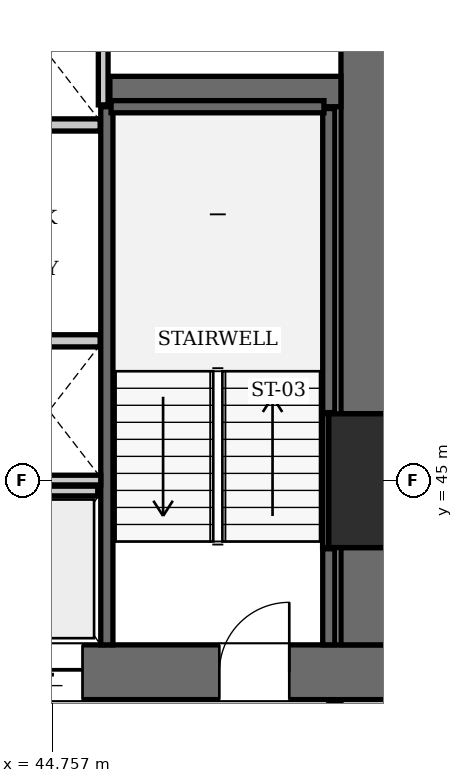
"""IFC4 building model, lengths in metres.
Left out: names, types, materials, properties, quantities, classifications, styles, units other than length and angle.
Written with IfcOpenShell. Run it as: python <this file> out.ifc"""

import sys

from ifc_helpers import new_model, si_unit, direction, frame, frame_2d, origin, origin_2d, place, context, subcontext, project, spatial, rectangle, extrude, element, fill, save


model = new_model("IFC4")
c1 = context("Model", 3, precision=1e-05, world=origin(), true_north=direction((0.0, 1.0)))
c2 = subcontext(c1, "Body", "Model", "MODEL_VIEW")
j1 = project(units=[si_unit("LENGTHUNIT", "METRE"), si_unit("PLANEANGLEUNIT", "RADIAN")], contexts=[c1])
p1 = place(None, origin())
s1 = spatial("IfcSite", under=j1, at=p1, CompositionType="ELEMENT")
p2 = place(p1, origin())
s2 = spatial("IfcBuilding", under=s1, at=p2, CompositionType="ELEMENT")
p3 = place(p2, frame((0.0, 0.0, 34.65)))
s3 = spatial("IfcBuildingStorey", under=s2, at=p3, CompositionType="ELEMENT", Elevation=34.65)
p4 = place(p3, frame((50.4, 45.0, 0.0), z_axis=(0.0, 0.0, 1.0), x_axis=(1.0, 0.0, 0.0)))
e1 = element("IfcColumn", 1, at=p4, inside=s3, PredefinedType="COLUMN", context=c2, shape_type="SweptSolid", body=[
    extrude(rectangle(XDim=2.2, YDim=2.2, at=origin_2d()), origin(), (0.0, 0.0, 1.0), 3.85),
])
p5 = place(p3, frame((43.6, 41.85, 0.0), z_axis=(0.0, 0.0, 1.0), x_axis=(1.0, 0.0, 0.0)))
e2 = element("IfcWall", 2, at=p5, inside=s3, PredefinedType="SHEAR", context=c2, shape_type="SweptSolid", body=[
    extrude(rectangle(XDim=6.8, YDim=0.9, at=frame_2d((3.4, 0.0))), origin(), (0.0, 0.0, 1.0), 3.85),
])
p6 = place(p5, frame((3.9, 0.0, 0.0)))
e3 = element("IfcOpeningElement", 3, at=p6, cuts=e2, PredefinedType="OPENING", context=c2, shape_type="SweptSolid", body=[
    extrude(rectangle(XDim=1.15, YDim=2.15, at=frame_2d((0.575, 1.075))), frame((0.0, 0.46, 0.0), z_axis=(0.0, -1.0, 0.0), x_axis=(1.0, 0.0, 0.0)), (0.0, 0.0, 1.0), 0.92),
])
p7 = place(p5, frame((0.55, 0.0, 0.0)))
e4 = element("IfcOpeningElement", 4, at=p7, cuts=e2, PredefinedType="OPENING", context=c2, shape_type="SweptSolid", body=[
    extrude(rectangle(XDim=1.1, YDim=2.2, at=frame_2d((0.55, 1.1))), frame((0.0, 0.46, 0.0), z_axis=(0.0, -1.0, 0.0), x_axis=(1.0, 0.0, 0.0)), (0.0, 0.0, 1.0), 0.92),
])
p8 = place(p3, frame((49.95, 42.3, 0.0), z_axis=(0.0, 0.0, 1.0), x_axis=(0.0, 1.0, 0.0)))
e5 = element("IfcWall", 5, at=p8, inside=s3, PredefinedType="SHEAR", context=c2, shape_type="SweptSolid", body=[
    extrude(rectangle(XDim=1.6, YDim=0.9, at=frame_2d((0.8, 0.0))), origin(), (0.0, 0.0, 1.0), 3.85),
])
p9 = place(p3, frame((49.95, 46.1, 0.0), z_axis=(0.0, 0.0, 1.0), x_axis=(0.0, 1.0, 0.0)))
e6 = element("IfcWall", 6, at=p9, inside=s3, PredefinedType="SHEAR", context=c2, shape_type="SweptSolid", body=[
    extrude(rectangle(XDim=7.0, YDim=0.9, at=frame_2d((3.5, 0.0))), origin(), (0.0, 0.0, 1.0), 3.85),
])
p10 = place(p3, frame((45.7, 51.4, 0.0), z_axis=(0.0, 0.0, 1.0), x_axis=(1.0, 0.0, 0.0)))
e7 = element("IfcWall", 7, at=p10, inside=s3, PredefinedType="SHEAR", context=c2, shape_type="SweptSolid", body=[
    extrude(rectangle(XDim=3.8, YDim=0.5, at=frame_2d((1.9, 0.0))), origin(), (0.0, 0.0, 1.0), 3.85),
])
p11 = place(p3, frame((45.65, 42.3, 0.0), z_axis=(0.0, 0.0, 1.0), x_axis=(0.0, 1.0, 0.0)))
e8 = element("IfcWall", 8, at=p11, inside=s3, PredefinedType="SOLIDWALL", context=c2, shape_type="SweptSolid", body=[
    extrude(rectangle(XDim=8.85, YDim=0.2, at=frame_2d((4.425, 0.0))), origin(), (0.0, 0.0, 1.0), 3.61),
])
p12 = place(p3, frame((49.3, 42.3, 0.0), z_axis=(0.0, 0.0, 1.0), x_axis=(0.0, 1.0, 0.0)))
e9 = element("IfcWall", 9, at=p12, inside=s3, PredefinedType="SOLIDWALL", context=c2, shape_type="SweptSolid", body=[
    extrude(rectangle(XDim=1.58, YDim=0.2, at=frame_2d((0.79, 0.0))), origin(), (0.0, 0.0, 1.0), 3.61),
])
p13 = place(p3, frame((49.3, 46.12, 0.0), z_axis=(0.0, 0.0, 1.0), x_axis=(0.0, 1.0, 0.0)))
e10 = element("IfcWall", 10, at=p13, inside=s3, PredefinedType="SOLIDWALL", context=c2, shape_type="SweptSolid", body=[
    extrude(rectangle(XDim=5.0, YDim=0.2, at=frame_2d((2.5, 0.0))), origin(), (0.0, 0.0, 1.0), 3.61),
])
p14 = place(p3, frame((45.72, 51.15, 0.0), z_axis=(0.0, 0.0, 1.0), x_axis=(1.0, 0.0, 0.0)))
e11 = element("IfcWall", 11, at=p14, inside=s3, PredefinedType="SOLIDWALL", context=c2, shape_type="SweptSolid", body=[
    extrude(rectangle(XDim=3.5, YDim=0.2, at=frame_2d((1.75, 0.0))), origin(), (0.0, 0.0, 1.0), 3.61),
])
p15 = place(p3, frame((49.248, 43.9, 0.0), z_axis=(0.0, 0.0, 1.0), x_axis=(0.0, 1.0, 0.0)))
e12 = element("IfcWall", 12, at=p15, inside=s3, PredefinedType="SOLIDWALL", context=c2, shape_type="SweptSolid", body=[
    extrude(rectangle(XDim=2.2, YDim=0.1, at=frame_2d((1.1, 0.0))), origin(), (0.0, 0.0, 1.0), 3.61),
])
for number, where, z_axis, x_axis in (
    (13, (43.86, 47.3, 0.0), (0.0, 0.0, 1.0), (1.0, 0.0, 0.0)),
    (14, (43.86, 50.85, 0.0), (0.0, 0.0, 1.0), (1.0, 0.0, 0.0)),
):
    element("IfcWall", number, at=place(p3, frame(where, z_axis=z_axis, x_axis=x_axis)), inside=s3, PredefinedType="SOLIDWALL", context=c2, shape_type="SweptSolid", body=[
        extrude(rectangle(XDim=1.68, YDim=0.2, at=frame_2d((0.84, 0.0))), origin(), (0.0, 0.0, 1.0), 3.61),
    ])
p16 = place(p3, frame((43.9, 44.83, 0.0), z_axis=(0.0, 0.0, 1.0), x_axis=(1.0, 0.0, 0.0)))
e15 = element("IfcWall", 15, at=p16, inside=s3, PredefinedType="SOLIDWALL", context=c2, shape_type="SweptSolid", body=[
    extrude(rectangle(XDim=1.6, YDim=0.16, at=frame_2d((0.8, 0.0))), origin(), (0.0, 0.0, 1.0), 3.61),
])
p17 = place(p3, frame((42.1, 45.01, 0.0), z_axis=(0.0, 0.0, 1.0), x_axis=(1.0, 0.0, 0.0)))
e16 = element("IfcWall", 16, at=p17, inside=s3, PredefinedType="SOLIDWALL", context=c2, shape_type="SweptSolid", body=[
    extrude(rectangle(XDim=3.45, YDim=0.16, at=frame_2d((1.725, 0.0))), origin(), (0.0, 0.0, 1.0), 3.61),
])
p18 = place(p3, frame((45.59, 51.18, 0.0), z_axis=(0.0, 0.0, 1.0), x_axis=(0.0, 1.0, 0.0)))
e17 = element("IfcWall", 17, at=p18, inside=s3, PredefinedType="SOLIDWALL", context=c2, shape_type="SweptSolid", body=[
    extrude(rectangle(XDim=1.92, YDim=0.16, at=frame_2d((0.96, 0.0))), origin(), (0.0, 0.0, 1.0), 3.61),
])
p19 = place(p3, frame((49.4, 38.31, 0.0), z_axis=(0.0, 0.0, 1.0), x_axis=(0.0, 1.0, 0.0)))
e18 = element("IfcWall", 18, at=p19, inside=s3, PredefinedType="PARTITIONING", context=c2, shape_type="SweptSolid", body=[
    extrude(rectangle(XDim=3.07, YDim=0.2, at=frame_2d((1.535, 0.0))), origin(), (0.0, 0.0, 1.0), 3.61),
])
p20 = place(p6, origin())
e19 = element("IfcDoor", 19, at=p20, inside=s3, OperationType="SINGLE_SWING_RIGHT", PredefinedType="DOOR", context=c2, shape_type="SweptSolid", body=[
    extrude(rectangle(XDim=1.15, YDim=2.15, at=frame_2d((0.575, 1.075))), frame((0.0, 0.025, 0.0), z_axis=(0.0, -1.0, 0.0), x_axis=(1.0, 0.0, 0.0)), (0.0, 0.0, 1.0), 0.05),
])
fill(e3, e19)
p21 = place(p7, frame((1.1, 0.0, 0.0), z_axis=(0.0, 0.0, 1.0), x_axis=(-1.0, 0.0, 0.0)))
e20 = element("IfcDoor", 20, at=p21, inside=s3, OperationType="SLIDING_TO_LEFT", PredefinedType="DOOR", context=c2, shape_type="SweptSolid", body=[
    extrude(rectangle(XDim=1.1, YDim=2.2, at=frame_2d((0.55, 1.1))), frame((0.0, 0.025, 0.0), z_axis=(0.0, -1.0, 0.0), x_axis=(1.0, 0.0, 0.0)), (0.0, 0.0, 1.0), 0.05),
])
fill(e4, e20)
save(model, sys.argv[1])
